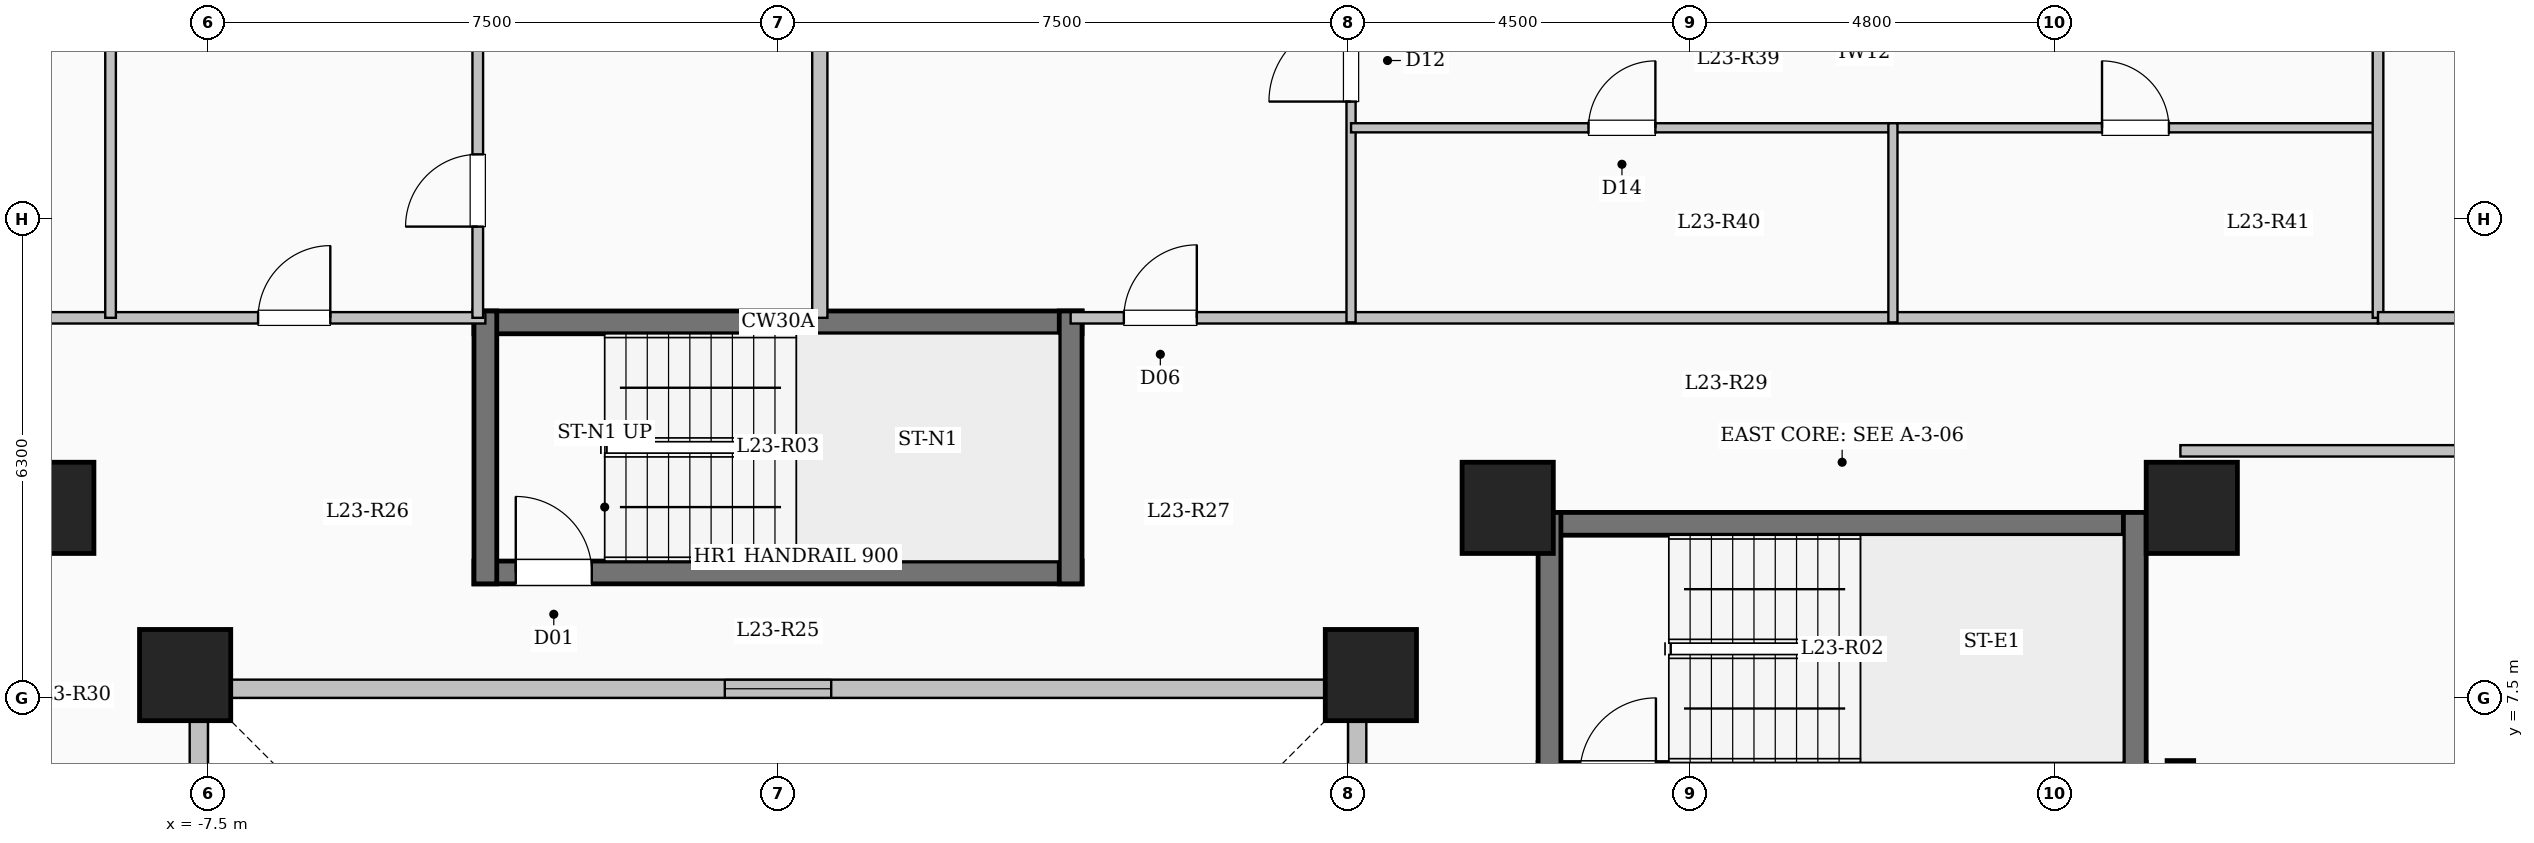
"""IFC4 building model, lengths in metres.
Left out: names, types, materials, properties, quantities, classifications, styles, units other than length and angle.
Written with IfcOpenShell. Run it as: python <this file> out.ifc"""

import sys

from ifc_helpers import new_model, si_unit, direction, frame, frame_2d, origin, origin_2d, place, context, subcontext, project, spatial, rectangle, extrude, element, fill, save


model = new_model("IFC4")
c1 = context("Model", 3, precision=1e-05, world=origin(), true_north=direction((0.0, 1.0)))
c2 = subcontext(c1, "Body", "Model", "MODEL_VIEW")
j1 = project(units=[si_unit("LENGTHUNIT", "METRE"), si_unit("PLANEANGLEUNIT", "RADIAN")], contexts=[c1])
p1 = place(None, origin())
s1 = spatial("IfcSite", under=j1, at=p1, CompositionType="ELEMENT")
p2 = place(p1, origin())
s2 = spatial("IfcBuilding", under=s1, at=p2, CompositionType="ELEMENT")
p3 = place(p2, frame((0.0, 0.0, 88.35)))
s3 = spatial("IfcBuildingStorey", under=s2, at=p3, CompositionType="ELEMENT", Elevation=88.35)
for number, where, z_axis, x_axis in (
    (1, (-7.8, 7.8, 0.0), (0.0, 0.0, 1.0), (1.0, 0.0, 0.0)),
    (2, (7.8, 7.8, 0.0), (0.0, 0.0, 1.0), (1.0, 0.0, 0.0)),
    (3, (-9.6, 10.0, 0.0), (0.0, 0.0, 1.0), (1.0, 0.0, 0.0)),
    (4, (9.6, 10.0, 0.0), (0.0, 0.0, 1.0), (1.0, 0.0, 0.0)),
    (5, (18.6, 10.0, 0.0), (0.0, 0.0, 1.0), (1.0, 0.0, 0.0)),
):
    element("IfcColumn", number, at=place(p3, frame(where, z_axis=z_axis, x_axis=x_axis)), inside=s3, PredefinedType="COLUMN", context=c2, shape_type="SweptSolid", body=[
        extrude(rectangle(XDim=1.2, YDim=1.2, at=origin_2d()), origin(), (0.0, 0.0, 1.0), 3.35),
    ])
p4 = place(p3, frame((7.62, -7.62, 0.0), z_axis=(0.0, 0.0, 1.0), x_axis=(0.0, 1.0, 0.0)))
e6 = element("IfcWall", 6, at=p4, inside=s3, PredefinedType="SOLIDWALL", context=c2, shape_type="SweptSolid", body=[
    extrude(rectangle(XDim=15.24, YDim=0.24, at=frame_2d((7.62, 0.0))), origin(), (0.0, 0.0, 1.0), 3.1),
])
p5 = place(p4, frame((6.92, 0.0, 0.95)))
e7 = element("IfcOpeningElement", 7, at=p5, cuts=e6, PredefinedType="OPENING", context=c2, shape_type="SweptSolid", body=[
    extrude(rectangle(XDim=1.4, YDim=1.5, at=frame_2d((0.7, 0.75))), frame((0.0, 0.13, 0.0), z_axis=(0.0, -1.0, 0.0), x_axis=(1.0, 0.0, 0.0)), (0.0, 0.0, 1.0), 0.26),
])
p6 = place(p3, frame((7.62, 7.62, 0.0), z_axis=(0.0, 0.0, 1.0), x_axis=(-1.0, 0.0, 0.0)))
e8 = element("IfcWall", 8, at=p6, inside=s3, PredefinedType="SOLIDWALL", context=c2, shape_type="SweptSolid", body=[
    extrude(rectangle(XDim=15.24, YDim=0.24, at=frame_2d((7.62, 0.0))), origin(), (0.0, 0.0, 1.0), 3.1),
])
p7 = place(p6, frame((6.92, 0.0, 0.95)))
e9 = element("IfcOpeningElement", 9, at=p7, cuts=e8, PredefinedType="OPENING", context=c2, shape_type="SweptSolid", body=[
    extrude(rectangle(XDim=1.4, YDim=1.5, at=frame_2d((0.7, 0.75))), frame((0.0, 0.13, 0.0), z_axis=(0.0, -1.0, 0.0), x_axis=(1.0, 0.0, 0.0)), (0.0, 0.0, 1.0), 0.26),
])
p8 = place(p3, frame((-7.62, 7.62, 0.0), z_axis=(0.0, 0.0, 1.0), x_axis=(0.0, -1.0, 0.0)))
e10 = element("IfcWall", 10, at=p8, inside=s3, PredefinedType="SOLIDWALL", context=c2, shape_type="SweptSolid", body=[
    extrude(rectangle(XDim=15.24, YDim=0.24, at=frame_2d((7.62, 0.0))), origin(), (0.0, 0.0, 1.0), 3.1),
])
p9 = place(p8, frame((6.92, 0.0, 0.95)))
e11 = element("IfcOpeningElement", 11, at=p9, cuts=e10, PredefinedType="OPENING", context=c2, shape_type="SweptSolid", body=[
    extrude(rectangle(XDim=1.4, YDim=1.5, at=frame_2d((0.7, 0.75))), frame((0.0, 0.13, 0.0), z_axis=(0.0, -1.0, 0.0), x_axis=(1.0, 0.0, 0.0)), (0.0, 0.0, 1.0), 0.26),
])
p10 = place(p3, frame((10.0, 9.79, 0.0), z_axis=(0.0, 0.0, 1.0), x_axis=(1.0, 0.0, 0.0)))
e12 = element("IfcWall", 12, at=p10, inside=s3, PredefinedType="SHEAR", context=c2, shape_type="SweptSolid", body=[
    extrude(rectangle(XDim=8.0, YDim=0.3, at=frame_2d((4.0, 0.0))), origin(), (0.0, 0.0, 1.0), 3.35),
])
p11 = place(p3, frame((10.0, 6.5, 0.0), z_axis=(0.0, 0.0, 1.0), x_axis=(1.0, 0.0, 0.0)))
e13 = element("IfcWall", 13, at=p11, inside=s3, PredefinedType="SHEAR", context=c2, shape_type="SweptSolid", body=[
    extrude(rectangle(XDim=8.0, YDim=0.3, at=frame_2d((4.0, 0.0))), origin(), (0.0, 0.0, 1.0), 3.35),
])
p12 = place(p11, frame((0.55, 0.0, 0.0)))
e14 = element("IfcOpeningElement", 14, at=p12, cuts=e13, PredefinedType="OPENING", context=c2, shape_type="SweptSolid", body=[
    extrude(rectangle(XDim=1.0, YDim=2.15, at=frame_2d((0.5, 1.075))), frame((0.0, 0.16, 0.0), z_axis=(0.0, -1.0, 0.0), x_axis=(1.0, 0.0, 0.0)), (0.0, 0.0, 1.0), 0.32),
])
for number, where, z_axis, x_axis in (
    (15, (10.15, 6.35, 0.0), (0.0, 0.0, 1.0), (0.0, 1.0, 0.0)),
    (16, (17.85, 6.35, 0.0), (0.0, 0.0, 1.0), (0.0, 1.0, 0.0)),
):
    element("IfcWall", number, at=place(p3, frame(where, z_axis=z_axis, x_axis=x_axis)), inside=s3, PredefinedType="SHEAR", context=c2, shape_type="SweptSolid", body=[
        extrude(rectangle(XDim=3.59, YDim=0.3, at=frame_2d((1.795, 0.0))), origin(), (0.0, 0.0, 1.0), 3.35),
    ])
p13 = place(p3, frame((-4.0, 12.44, 0.0), z_axis=(0.0, 0.0, 1.0), x_axis=(1.0, 0.0, 0.0)))
e17 = element("IfcWall", 17, at=p13, inside=s3, PredefinedType="SHEAR", context=c2, shape_type="SweptSolid", body=[
    extrude(rectangle(XDim=8.0, YDim=0.3, at=frame_2d((4.0, 0.0))), origin(), (0.0, 0.0, 1.0), 3.35),
])
p14 = place(p3, frame((-4.0, 9.15, 0.0), z_axis=(0.0, 0.0, 1.0), x_axis=(1.0, 0.0, 0.0)))
e18 = element("IfcWall", 18, at=p14, inside=s3, PredefinedType="SHEAR", context=c2, shape_type="SweptSolid", body=[
    extrude(rectangle(XDim=8.0, YDim=0.3, at=frame_2d((4.0, 0.0))), origin(), (0.0, 0.0, 1.0), 3.35),
])
p15 = place(p14, frame((0.55, 0.0, 0.0)))
e19 = element("IfcOpeningElement", 19, at=p15, cuts=e18, PredefinedType="OPENING", context=c2, shape_type="SweptSolid", body=[
    extrude(rectangle(XDim=1.0, YDim=2.15, at=frame_2d((0.5, 1.075))), frame((0.0, 0.16, 0.0), z_axis=(0.0, -1.0, 0.0), x_axis=(1.0, 0.0, 0.0)), (0.0, 0.0, 1.0), 0.32),
])
for number, where, z_axis, x_axis in (
    (20, (-3.85, 9.0, 0.0), (0.0, 0.0, 1.0), (0.0, 1.0, 0.0)),
    (21, (3.85, 9.0, 0.0), (0.0, 0.0, 1.0), (0.0, 1.0, 0.0)),
):
    element("IfcWall", number, at=place(p3, frame(where, z_axis=z_axis, x_axis=x_axis)), inside=s3, PredefinedType="SHEAR", context=c2, shape_type="SweptSolid", body=[
        extrude(rectangle(XDim=3.59, YDim=0.3, at=frame_2d((1.795, 0.0))), origin(), (0.0, 0.0, 1.0), 3.35),
    ])
p16 = place(p3, frame((18.45, -7.375, 0.0), z_axis=(0.0, 0.0, 1.0), x_axis=(0.0, 1.0, 0.0)))
e22 = element("IfcWall", 22, at=p16, inside=s3, PredefinedType="SHEAR", context=c2, shape_type="SweptSolid", body=[
    extrude(rectangle(XDim=14.05, YDim=0.35, at=frame_2d((7.025, 0.0))), origin(), (0.0, 0.0, 1.0), 3.35),
])
p17 = place(p3, frame((-21.05, 12.5, 0.0), z_axis=(0.0, 0.0, 1.0), x_axis=(1.0, 0.0, 0.0)))
e23 = element("IfcWall", 23, at=p17, inside=s3, PredefinedType="PARTITIONING", context=c2, shape_type="SweptSolid", body=[
    extrude(rectangle(XDim=17.2, YDim=0.15, at=frame_2d((8.6, 0.0))), origin(), (0.0, 0.0, 1.0), 3.1),
])
p18 = place(p17, frame((2.562, 0.0, 0.0)))
e24 = element("IfcOpeningElement", 24, at=p18, cuts=e23, PredefinedType="OPENING", context=c2, shape_type="SweptSolid", body=[
    extrude(rectangle(XDim=0.95, YDim=2.15, at=frame_2d((0.475, 1.075))), frame((0.0, 0.085, 0.0), z_axis=(0.0, -1.0, 0.0), x_axis=(1.0, 0.0, 0.0)), (0.0, 0.0, 1.0), 0.17),
])
p19 = place(p17, frame((8.726, 0.0, 0.0)))
e25 = element("IfcOpeningElement", 25, at=p19, cuts=e23, PredefinedType="OPENING", context=c2, shape_type="SweptSolid", body=[
    extrude(rectangle(XDim=0.95, YDim=2.15, at=frame_2d((0.475, 1.075))), frame((0.0, 0.085, 0.0), z_axis=(0.0, -1.0, 0.0), x_axis=(1.0, 0.0, 0.0)), (0.0, 0.0, 1.0), 0.17),
])
p20 = place(p17, frame((14.21, 0.0, 0.0)))
e26 = element("IfcOpeningElement", 26, at=p20, cuts=e23, PredefinedType="OPENING", context=c2, shape_type="SweptSolid", body=[
    extrude(rectangle(XDim=0.95, YDim=2.15, at=frame_2d((0.475, 1.075))), frame((0.0, 0.085, 0.0), z_axis=(0.0, -1.0, 0.0), x_axis=(1.0, 0.0, 0.0)), (0.0, 0.0, 1.0), 0.17),
])
p21 = place(p3, frame((3.85, 12.5, 0.0), z_axis=(0.0, 0.0, 1.0), x_axis=(1.0, 0.0, 0.0)))
e27 = element("IfcWall", 27, at=p21, inside=s3, PredefinedType="PARTITIONING", context=c2, shape_type="SweptSolid", body=[
    extrude(rectangle(XDim=17.2, YDim=0.15, at=frame_2d((8.6, 0.0))), origin(), (0.0, 0.0, 1.0), 3.1),
])
p22 = place(p21, frame((0.7, 0.0, 0.0)))
e28 = element("IfcOpeningElement", 28, at=p22, cuts=e27, PredefinedType="OPENING", context=c2, shape_type="SweptSolid", body=[
    extrude(rectangle(XDim=0.96, YDim=2.15, at=frame_2d((0.48, 1.075))), frame((0.0, 0.085, 0.0), z_axis=(0.0, -1.0, 0.0), x_axis=(1.0, 0.0, 0.0)), (0.0, 0.0, 1.0), 0.17),
])
p23 = place(p3, frame((0.55, 12.5, 0.0), z_axis=(0.0, 0.0, 1.0), x_axis=(0.0, 1.0, 0.0)))
e29 = element("IfcWall", 29, at=p23, inside=s3, PredefinedType="SOLIDWALL", context=c2, shape_type="SweptSolid", body=[
    extrude(rectangle(XDim=11.08, YDim=0.2, at=frame_2d((5.54, 0.0))), origin(), (0.0, 0.0, 1.0), 3.1),
])
p24 = place(p3, frame((-3.95, 12.5, 0.0), z_axis=(0.0, 0.0, 1.0), x_axis=(0.0, 1.0, 0.0)))
e30 = element("IfcWall", 30, at=p24, inside=s3, PredefinedType="PARTITIONING", context=c2, shape_type="SweptSolid", body=[
    extrude(rectangle(XDim=9.55, YDim=0.14, at=frame_2d((4.775, 0.0))), origin(), (0.0, 0.0, 1.0), 3.1),
])
p25 = place(p24, frame((1.2, 0.0, 0.0)))
e31 = element("IfcOpeningElement", 31, at=p25, cuts=e30, PredefinedType="OPENING", context=c2, shape_type="SweptSolid", body=[
    extrude(rectangle(XDim=0.95, YDim=2.15, at=frame_2d((0.475, 1.075))), frame((0.0, 0.08, 0.0), z_axis=(0.0, -1.0, 0.0), x_axis=(1.0, 0.0, 0.0)), (0.0, 0.0, 1.0), 0.16),
])
p26 = place(p3, frame((-8.781, 12.5, 0.0), z_axis=(0.0, 0.0, 1.0), x_axis=(0.0, 1.0, 0.0)))
e32 = element("IfcWall", 32, at=p26, inside=s3, PredefinedType="PARTITIONING", context=c2, shape_type="SweptSolid", body=[
    extrude(rectangle(XDim=9.55, YDim=0.14, at=frame_2d((4.775, 0.0))), origin(), (0.0, 0.0, 1.0), 3.1),
])
p27 = place(p3, frame((7.539, 12.44, 0.0), z_axis=(0.0, 0.0, 1.0), x_axis=(0.0, 1.0, 0.0)))
e33 = element("IfcWall", 33, at=p27, inside=s3, PredefinedType="PARTITIONING", context=c2, shape_type="SweptSolid", body=[
    extrude(rectangle(XDim=10.514, YDim=0.12, at=frame_2d((5.257, 0.0))), origin(), (0.0, 0.0, 1.0), 2.435),
])
p28 = place(p27, frame((2.905, 0.0, 0.0)))
e34 = element("IfcOpeningElement", 34, at=p28, cuts=e33, PredefinedType="OPENING", context=c2, shape_type="SweptSolid", body=[
    extrude(rectangle(XDim=1.08, YDim=2.15, at=frame_2d((0.54, 1.075))), frame((0.0, 0.07, 0.0), z_axis=(0.0, -1.0, 0.0), x_axis=(1.0, 0.0, 0.0)), (0.0, 0.0, 1.0), 0.14),
])
p29 = place(p3, frame((7.539, 15.0, 0.0), z_axis=(0.0, 0.0, 1.0), x_axis=(1.0, 0.0, 0.0)))
e35 = element("IfcWall", 35, at=p29, inside=s3, PredefinedType="PARTITIONING", context=c2, shape_type="SweptSolid", body=[
    extrude(rectangle(XDim=7.129, YDim=0.12, at=frame_2d((3.564, 0.0))), origin(), (0.0, 0.0, 1.0), 3.1),
])
p30 = place(p29, frame((3.124, 0.0, 0.0)))
e36 = element("IfcOpeningElement", 36, at=p30, cuts=e35, PredefinedType="OPENING", context=c2, shape_type="SweptSolid", body=[
    extrude(rectangle(XDim=0.88, YDim=2.1, at=frame_2d((0.44, 1.05))), frame((0.0, 0.07, 0.0), z_axis=(0.0, -1.0, 0.0), x_axis=(1.0, 0.0, 0.0)), (0.0, 0.0, 1.0), 0.14),
])
p31 = place(p3, frame((14.668, 15.0, 0.0), z_axis=(0.0, 0.0, 1.0), x_axis=(1.0, 0.0, 0.0)))
e37 = element("IfcWall", 37, at=p31, inside=s3, PredefinedType="PARTITIONING", context=c2, shape_type="SweptSolid", body=[
    extrude(rectangle(XDim=6.382, YDim=0.12, at=frame_2d((3.191, 0.0))), origin(), (0.0, 0.0, 1.0), 3.1),
])
p32 = place(p31, frame((2.751, 0.0, 0.0)))
e38 = element("IfcOpeningElement", 38, at=p32, cuts=e37, PredefinedType="OPENING", context=c2, shape_type="SweptSolid", body=[
    extrude(rectangle(XDim=0.88, YDim=2.1, at=frame_2d((0.44, 1.05))), frame((0.0, 0.07, 0.0), z_axis=(0.0, -1.0, 0.0), x_axis=(1.0, 0.0, 0.0)), (0.0, 0.0, 1.0), 0.14),
])
p33 = place(p3, frame((14.668, 12.44, 0.0), z_axis=(0.0, 0.0, 1.0), x_axis=(0.0, 1.0, 0.0)))
e39 = element("IfcWall", 39, at=p33, inside=s3, PredefinedType="PARTITIONING", context=c2, shape_type="SweptSolid", body=[
    extrude(rectangle(XDim=2.62, YDim=0.12, at=frame_2d((1.31, 0.0))), origin(), (0.0, 0.0, 1.0), 3.1),
])
p34 = place(p3, frame((18.45, 10.75, 0.0), z_axis=(0.0, 0.0, 1.0), x_axis=(1.0, 0.0, 0.0)))
e40 = element("IfcWall", 40, at=p34, inside=s3, PredefinedType="PARTITIONING", context=c2, shape_type="SweptSolid", body=[
    extrude(rectangle(XDim=8.43, YDim=0.15, at=frame_2d((4.215, 0.0))), origin(), (0.0, 0.0, 1.0), 3.1),
])
p35 = place(p3, frame((21.05, 12.5, 0.0), z_axis=(0.0, 0.0, 1.0), x_axis=(0.0, 1.0, 0.0)))
e41 = element("IfcWall", 41, at=p35, inside=s3, PredefinedType="PARTITIONING", context=c2, shape_type="SweptSolid", body=[
    extrude(rectangle(XDim=5.35, YDim=0.14, at=frame_2d((2.675, 0.0))), origin(), (0.0, 0.0, 1.0), 3.1),
])
p36 = place(p3, frame((21.05, 12.5, 0.0), z_axis=(0.0, 0.0, 1.0), x_axis=(1.0, 0.0, 0.0)))
e42 = element("IfcWall", 42, at=p36, inside=s3, PredefinedType="PARTITIONING", context=c2, shape_type="SweptSolid", body=[
    extrude(rectangle(XDim=5.83, YDim=0.15, at=frame_2d((2.915, 0.0))), origin(), (0.0, 0.0, 1.0), 3.1),
])
p37 = place(p36, frame((2.44, 0.0, 0.0)))
e43 = element("IfcOpeningElement", 43, at=p37, cuts=e42, PredefinedType="OPENING", context=c2, shape_type="SweptSolid", body=[
    extrude(rectangle(XDim=0.95, YDim=2.15, at=frame_2d((0.475, 1.075))), frame((0.0, 0.085, 0.0), z_axis=(0.0, -1.0, 0.0), x_axis=(1.0, 0.0, 0.0)), (0.0, 0.0, 1.0), 0.17),
])
p38 = place(p7, origin())
e44 = element("IfcWindow", 44, at=p38, inside=s3, PartitioningType="SINGLE_PANEL", PredefinedType="WINDOW", context=c2, shape_type="SweptSolid", body=[
    extrude(rectangle(XDim=1.4, YDim=1.5, at=frame_2d((0.7, 0.75))), frame((0.0, 0.03, 0.0), z_axis=(0.0, -1.0, 0.0), x_axis=(1.0, 0.0, 0.0)), (0.0, 0.0, 1.0), 0.06),
])
fill(e9, e44)
p39 = place(p15, origin())
e45 = element("IfcDoor", 45, at=p39, inside=s3, OperationType="SINGLE_SWING_LEFT", PredefinedType="DOOR", context=c2, shape_type="SweptSolid", body=[
    extrude(rectangle(XDim=1.0, YDim=2.15, at=frame_2d((0.5, 1.075))), frame((0.0, 0.025, 0.0), z_axis=(0.0, -1.0, 0.0), x_axis=(1.0, 0.0, 0.0)), (0.0, 0.0, 1.0), 0.05),
])
fill(e19, e45)
p40 = place(p20, origin())
e46 = element("IfcDoor", 46, at=p40, inside=s3, OperationType="SINGLE_SWING_RIGHT", PredefinedType="DOOR", context=c2, shape_type="SweptSolid", body=[
    extrude(rectangle(XDim=0.95, YDim=2.15, at=frame_2d((0.475, 1.075))), frame((0.0, 0.025, 0.0), z_axis=(0.0, -1.0, 0.0), x_axis=(1.0, 0.0, 0.0)), (0.0, 0.0, 1.0), 0.05),
])
fill(e26, e46)
p41 = place(p25, origin())
e47 = element("IfcDoor", 47, at=p41, inside=s3, OperationType="SINGLE_SWING_LEFT", PredefinedType="DOOR", context=c2, shape_type="SweptSolid", body=[
    extrude(rectangle(XDim=0.95, YDim=2.15, at=frame_2d((0.475, 1.075))), frame((0.0, 0.025, 0.0), z_axis=(0.0, -1.0, 0.0), x_axis=(1.0, 0.0, 0.0)), (0.0, 0.0, 1.0), 0.05),
])
fill(e31, e47)
p42 = place(p22, origin())
e48 = element("IfcDoor", 48, at=p42, inside=s3, OperationType="SINGLE_SWING_RIGHT", PredefinedType="DOOR", context=c2, shape_type="SweptSolid", body=[
    extrude(rectangle(XDim=0.96, YDim=2.15, at=frame_2d((0.48, 1.075))), frame((0.0, 0.025, 0.0), z_axis=(0.0, -1.0, 0.0), x_axis=(1.0, 0.0, 0.0)), (0.0, 0.0, 1.0), 0.05),
])
fill(e28, e48)
p43 = place(p28, origin())
e49 = element("IfcDoor", 49, at=p43, inside=s3, OperationType="SINGLE_SWING_LEFT", PredefinedType="DOOR", context=c2, shape_type="SweptSolid", body=[
    extrude(rectangle(XDim=1.08, YDim=2.15, at=frame_2d((0.54, 1.075))), frame((0.0, 0.025, 0.0), z_axis=(0.0, -1.0, 0.0), x_axis=(1.0, 0.0, 0.0)), (0.0, 0.0, 1.0), 0.05),
])
fill(e34, e49)
p44 = place(p30, origin())
e50 = element("IfcDoor", 50, at=p44, inside=s3, OperationType="SINGLE_SWING_RIGHT", PredefinedType="DOOR", context=c2, shape_type="SweptSolid", body=[
    extrude(rectangle(XDim=0.88, YDim=2.1, at=frame_2d((0.44, 1.05))), frame((0.0, 0.025, 0.0), z_axis=(0.0, -1.0, 0.0), x_axis=(1.0, 0.0, 0.0)), (0.0, 0.0, 1.0), 0.05),
])
fill(e36, e50)
p45 = place(p32, origin())
e51 = element("IfcDoor", 51, at=p45, inside=s3, OperationType="SINGLE_SWING_LEFT", PredefinedType="DOOR", context=c2, shape_type="SweptSolid", body=[
    extrude(rectangle(XDim=0.88, YDim=2.1, at=frame_2d((0.44, 1.05))), frame((0.0, 0.025, 0.0), z_axis=(0.0, -1.0, 0.0), x_axis=(1.0, 0.0, 0.0)), (0.0, 0.0, 1.0), 0.05),
])
fill(e38, e51)
save(model, sys.argv[1])
